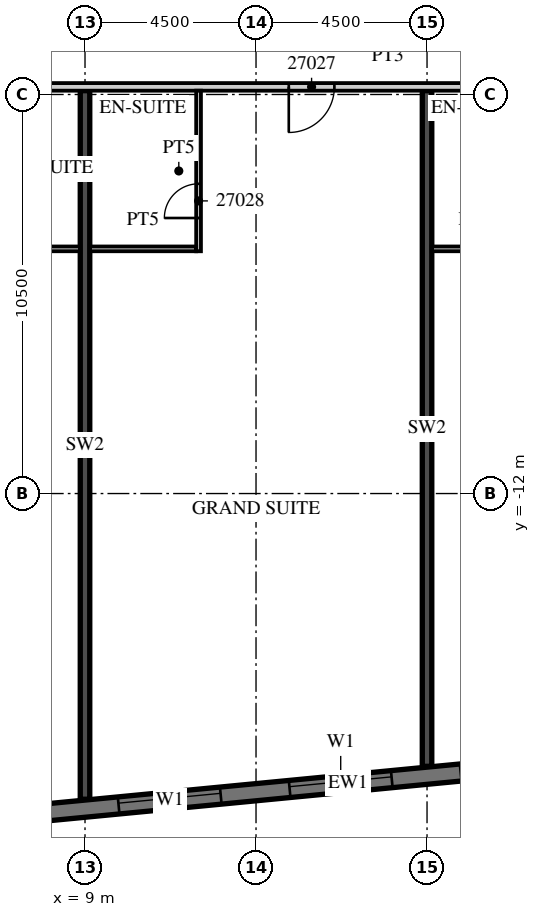
"""IFC4 building model, lengths in metres.
Left out: names, types, materials, properties, quantities, classifications, styles, units other than length and angle.
Written with IfcOpenShell. Run it as: python <this file> out.ifc"""

import sys

from ifc_helpers import new_model, si_unit, direction, frame, frame_2d, origin, place, context, subcontext, project, spatial, rectangle, extrude, element, fill, save


model = new_model("IFC4")
c1 = context("Model", 3, precision=1e-05, world=origin(), true_north=direction((0.0, 1.0)))
c2 = subcontext(c1, "Body", "Model", "MODEL_VIEW")
j1 = project(units=[si_unit("LENGTHUNIT", "METRE"), si_unit("PLANEANGLEUNIT", "RADIAN")], contexts=[c1])
p1 = place(None, origin())
s1 = spatial("IfcSite", under=j1, at=p1, CompositionType="ELEMENT")
p2 = place(p1, origin())
s2 = spatial("IfcBuilding", under=s1, at=p2, CompositionType="ELEMENT")
p3 = place(p2, frame((0.0, 0.0, 124.0)))
s3 = spatial("IfcBuildingStorey", under=s2, at=p3, CompositionType="ELEMENT", Elevation=124.0)
p4 = place(p3, frame((9.0, -20.044, 0.0), z_axis=(0.0, 0.0, 1.0), x_axis=(0.0, 1.0, 0.0)))
e1 = element("IfcWall", 1, at=p4, inside=s3, PredefinedType="SHEAR", context=c2, shape_type="SweptSolid", body=[
    extrude(rectangle(XDim=18.644, YDim=0.25, at=frame_2d((9.322, 0.0))), origin(), (0.0, 0.0, 1.0), 3.3),
])
p5 = place(p3, frame((18.0, -19.177, 0.0), z_axis=(0.0, 0.0, 1.0), x_axis=(0.0, 1.0, 0.0)))
e2 = element("IfcWall", 2, at=p5, inside=s3, PredefinedType="SHEAR", context=c2, shape_type="SweptSolid", body=[
    extrude(rectangle(XDim=17.777, YDim=0.25, at=frame_2d((8.889, 0.0))), origin(), (0.0, 0.0, 1.0), 3.3),
])
p6 = place(p3, frame((-13.521, -22.46, 0.0), z_axis=(0.0, 0.0, 1.0), x_axis=(0.995396096335, 0.095846812164, 0.0)))
e3 = element("IfcWall", 3, at=p6, inside=s3, PredefinedType="SOLIDWALL", context=c2, shape_type="SweptSolid", body=[
    extrude(rectangle(XDim=59.151, YDim=0.45, at=frame_2d((29.575, 0.0))), origin(), (0.0, 0.0, 1.0), 3.02),
])
p7 = place(p6, frame((0.91, 0.0, 0.45)))
e4 = element("IfcOpeningElement", 4, at=p7, cuts=e3, PredefinedType="OPENING", context=c2, shape_type="SweptSolid", body=[
    extrude(rectangle(XDim=2.7, YDim=2.25, at=frame_2d((1.35, 1.125))), frame((0.0, 0.235, 0.0), z_axis=(0.0, -1.0, 0.0), x_axis=(1.0, 0.0, 0.0)), (0.0, 0.0, 1.0), 0.47),
])
p8 = place(p6, frame((5.431, 0.0, 0.45)))
e5 = element("IfcOpeningElement", 5, at=p8, cuts=e3, PredefinedType="OPENING", context=c2, shape_type="SweptSolid", body=[
    extrude(rectangle(XDim=2.7, YDim=2.25, at=frame_2d((1.35, 1.125))), frame((0.0, 0.235, 0.0), z_axis=(0.0, -1.0, 0.0), x_axis=(1.0, 0.0, 0.0)), (0.0, 0.0, 1.0), 0.47),
])
p9 = place(p6, frame((9.952, 0.0, 0.45)))
e6 = element("IfcOpeningElement", 6, at=p9, cuts=e3, PredefinedType="OPENING", context=c2, shape_type="SweptSolid", body=[
    extrude(rectangle(XDim=2.7, YDim=2.25, at=frame_2d((1.35, 1.125))), frame((0.0, 0.235, 0.0), z_axis=(0.0, -1.0, 0.0), x_axis=(1.0, 0.0, 0.0)), (0.0, 0.0, 1.0), 0.47),
])
p10 = place(p6, frame((14.473, 0.0, 0.45)))
e7 = element("IfcOpeningElement", 7, at=p10, cuts=e3, PredefinedType="OPENING", context=c2, shape_type="SweptSolid", body=[
    extrude(rectangle(XDim=2.7, YDim=2.25, at=frame_2d((1.35, 1.125))), frame((0.0, 0.235, 0.0), z_axis=(0.0, -1.0, 0.0), x_axis=(1.0, 0.0, 0.0)), (0.0, 0.0, 1.0), 0.47),
])
p11 = place(p6, frame((18.994, 0.0, 0.45)))
e8 = element("IfcOpeningElement", 8, at=p11, cuts=e3, PredefinedType="OPENING", context=c2, shape_type="SweptSolid", body=[
    extrude(rectangle(XDim=2.7, YDim=2.25, at=frame_2d((1.35, 1.125))), frame((0.0, 0.235, 0.0), z_axis=(0.0, -1.0, 0.0), x_axis=(1.0, 0.0, 0.0)), (0.0, 0.0, 1.0), 0.47),
])
p12 = place(p6, frame((23.514, 0.0, 0.45)))
e9 = element("IfcOpeningElement", 9, at=p12, cuts=e3, PredefinedType="OPENING", context=c2, shape_type="SweptSolid", body=[
    extrude(rectangle(XDim=2.7, YDim=2.25, at=frame_2d((1.35, 1.125))), frame((0.0, 0.235, 0.0), z_axis=(0.0, -1.0, 0.0), x_axis=(1.0, 0.0, 0.0)), (0.0, 0.0, 1.0), 0.47),
])
p13 = place(p6, frame((28.035, 0.0, 0.45)))
e10 = element("IfcOpeningElement", 10, at=p13, cuts=e3, PredefinedType="OPENING", context=c2, shape_type="SweptSolid", body=[
    extrude(rectangle(XDim=2.7, YDim=2.25, at=frame_2d((1.35, 1.125))), frame((0.0, 0.235, 0.0), z_axis=(0.0, -1.0, 0.0), x_axis=(1.0, 0.0, 0.0)), (0.0, 0.0, 1.0), 0.47),
])
p14 = place(p6, frame((32.556, 0.0, 0.45)))
e11 = element("IfcOpeningElement", 11, at=p14, cuts=e3, PredefinedType="OPENING", context=c2, shape_type="SweptSolid", body=[
    extrude(rectangle(XDim=2.7, YDim=2.25, at=frame_2d((1.35, 1.125))), frame((0.0, 0.235, 0.0), z_axis=(0.0, -1.0, 0.0), x_axis=(1.0, 0.0, 0.0)), (0.0, 0.0, 1.0), 0.47),
])
p15 = place(p6, frame((37.077, 0.0, 0.45)))
e12 = element("IfcOpeningElement", 12, at=p15, cuts=e3, PredefinedType="OPENING", context=c2, shape_type="SweptSolid", body=[
    extrude(rectangle(XDim=2.7, YDim=2.25, at=frame_2d((1.35, 1.125))), frame((0.0, 0.235, 0.0), z_axis=(0.0, -1.0, 0.0), x_axis=(1.0, 0.0, 0.0)), (0.0, 0.0, 1.0), 0.47),
])
p16 = place(p6, frame((41.598, 0.0, 0.45)))
e13 = element("IfcOpeningElement", 13, at=p16, cuts=e3, PredefinedType="OPENING", context=c2, shape_type="SweptSolid", body=[
    extrude(rectangle(XDim=2.7, YDim=2.25, at=frame_2d((1.35, 1.125))), frame((0.0, 0.235, 0.0), z_axis=(0.0, -1.0, 0.0), x_axis=(1.0, 0.0, 0.0)), (0.0, 0.0, 1.0), 0.47),
])
p17 = place(p6, frame((46.118, 0.0, 0.45)))
e14 = element("IfcOpeningElement", 14, at=p17, cuts=e3, PredefinedType="OPENING", context=c2, shape_type="SweptSolid", body=[
    extrude(rectangle(XDim=2.7, YDim=2.25, at=frame_2d((1.35, 1.125))), frame((0.0, 0.235, 0.0), z_axis=(0.0, -1.0, 0.0), x_axis=(1.0, 0.0, 0.0)), (0.0, 0.0, 1.0), 0.47),
])
p18 = place(p6, frame((50.639, 0.0, 0.45)))
e15 = element("IfcOpeningElement", 15, at=p18, cuts=e3, PredefinedType="OPENING", context=c2, shape_type="SweptSolid", body=[
    extrude(rectangle(XDim=2.7, YDim=2.25, at=frame_2d((1.35, 1.125))), frame((0.0, 0.235, 0.0), z_axis=(0.0, -1.0, 0.0), x_axis=(1.0, 0.0, 0.0)), (0.0, 0.0, 1.0), 0.47),
])
p19 = place(p6, frame((55.15, 0.0, 0.45)))
e16 = element("IfcOpeningElement", 16, at=p19, cuts=e3, PredefinedType="OPENING", context=c2, shape_type="SweptSolid", body=[
    extrude(rectangle(XDim=2.7, YDim=2.25, at=frame_2d((1.35, 1.125))), frame((0.0, 0.235, 0.0), z_axis=(0.0, -1.0, 0.0), x_axis=(1.0, 0.0, 0.0)), (0.0, 0.0, 1.0), 0.47),
])
p20 = place(p3, frame((-13.5, -1.3, 0.0), z_axis=(0.0, 0.0, 1.0), x_axis=(1.0, 0.0, 0.0)))
e17 = element("IfcWall", 17, at=p20, inside=s3, PredefinedType="PARTITIONING", context=c2, shape_type="SweptSolid", body=[
    extrude(rectangle(XDim=60.932, YDim=0.2, at=frame_2d((30.466, 0.0))), origin(), (0.0, 0.0, 1.0), 3.02),
])
p21 = place(p20, frame((2.925, 0.0, 0.0)))
e18 = element("IfcOpeningElement", 18, at=p21, cuts=e17, PredefinedType="OPENING", context=c2, shape_type="SweptSolid", body=[
    extrude(rectangle(XDim=1.0, YDim=2.1, at=frame_2d((0.5, 1.05))), frame((0.0, 0.11, 0.0), z_axis=(0.0, -1.0, 0.0), x_axis=(1.0, 0.0, 0.0)), (0.0, 0.0, 1.0), 0.22),
])
p22 = place(p20, frame((9.863, 0.0, 0.0)))
e19 = element("IfcOpeningElement", 19, at=p22, cuts=e17, PredefinedType="OPENING", context=c2, shape_type="SweptSolid", body=[
    extrude(rectangle(XDim=1.2, YDim=2.1, at=frame_2d((0.6, 1.05))), frame((0.0, 0.11, 0.0), z_axis=(0.0, -1.0, 0.0), x_axis=(1.0, 0.0, 0.0)), (0.0, 0.0, 1.0), 0.22),
])
p23 = place(p20, frame((15.938, 0.0, 0.0)))
e20 = element("IfcOpeningElement", 20, at=p23, cuts=e17, PredefinedType="OPENING", context=c2, shape_type="SweptSolid", body=[
    extrude(rectangle(XDim=1.2, YDim=2.1, at=frame_2d((0.6, 1.05))), frame((0.0, 0.11, 0.0), z_axis=(0.0, -1.0, 0.0), x_axis=(1.0, 0.0, 0.0)), (0.0, 0.0, 1.0), 0.22),
])
p24 = place(p20, frame((27.862, 0.0, 0.0)))
e21 = element("IfcOpeningElement", 21, at=p24, cuts=e17, PredefinedType="OPENING", context=c2, shape_type="SweptSolid", body=[
    extrude(rectangle(XDim=1.2, YDim=2.1, at=frame_2d((0.6, 1.05))), frame((0.0, 0.11, 0.0), z_axis=(0.0, -1.0, 0.0), x_axis=(1.0, 0.0, 0.0)), (0.0, 0.0, 1.0), 0.22),
])
p25 = place(p20, frame((34.45, 0.0, 0.0)))
e22 = element("IfcOpeningElement", 22, at=p25, cuts=e17, PredefinedType="OPENING", context=c2, shape_type="SweptSolid", body=[
    extrude(rectangle(XDim=1.0, YDim=2.1, at=frame_2d((0.5, 1.05))), frame((0.0, 0.11, 0.0), z_axis=(0.0, -1.0, 0.0), x_axis=(1.0, 0.0, 0.0)), (0.0, 0.0, 1.0), 0.22),
])
p26 = place(p20, frame((36.55, 0.0, 0.0)))
e23 = element("IfcOpeningElement", 23, at=p26, cuts=e17, PredefinedType="OPENING", context=c2, shape_type="SweptSolid", body=[
    extrude(rectangle(XDim=1.0, YDim=2.1, at=frame_2d((0.5, 1.05))), frame((0.0, 0.11, 0.0), z_axis=(0.0, -1.0, 0.0), x_axis=(1.0, 0.0, 0.0)), (0.0, 0.0, 1.0), 0.22),
])
p27 = place(p20, frame((41.075, 0.0, 0.0)))
e24 = element("IfcOpeningElement", 24, at=p27, cuts=e17, PredefinedType="OPENING", context=c2, shape_type="SweptSolid", body=[
    extrude(rectangle(XDim=1.0, YDim=2.1, at=frame_2d((0.5, 1.05))), frame((0.0, 0.11, 0.0), z_axis=(0.0, -1.0, 0.0), x_axis=(1.0, 0.0, 0.0)), (0.0, 0.0, 1.0), 0.22),
])
p28 = place(p20, frame((45.55, 0.0, 0.0)))
e25 = element("IfcOpeningElement", 25, at=p28, cuts=e17, PredefinedType="OPENING", context=c2, shape_type="SweptSolid", body=[
    extrude(rectangle(XDim=1.0, YDim=2.1, at=frame_2d((0.5, 1.05))), frame((0.0, 0.11, 0.0), z_axis=(0.0, -1.0, 0.0), x_axis=(1.0, 0.0, 0.0)), (0.0, 0.0, 1.0), 0.22),
])
p29 = place(p20, frame((50.075, 0.0, 0.0)))
e26 = element("IfcOpeningElement", 26, at=p29, cuts=e17, PredefinedType="OPENING", context=c2, shape_type="SweptSolid", body=[
    extrude(rectangle(XDim=1.0, YDim=2.1, at=frame_2d((0.5, 1.05))), frame((0.0, 0.11, 0.0), z_axis=(0.0, -1.0, 0.0), x_axis=(1.0, 0.0, 0.0)), (0.0, 0.0, 1.0), 0.22),
])
p30 = place(p20, frame((54.575, 0.0, 0.0)))
e27 = element("IfcOpeningElement", 27, at=p30, cuts=e17, PredefinedType="OPENING", context=c2, shape_type="SweptSolid", body=[
    extrude(rectangle(XDim=1.0, YDim=2.1, at=frame_2d((0.5, 1.05))), frame((0.0, 0.11, 0.0), z_axis=(0.0, -1.0, 0.0), x_axis=(1.0, 0.0, 0.0)), (0.0, 0.0, 1.0), 0.22),
])
p31 = place(p20, frame((59.882, 0.0, 0.0)))
e28 = element("IfcOpeningElement", 28, at=p31, cuts=e17, PredefinedType="OPENING", context=c2, shape_type="SweptSolid", body=[
    extrude(rectangle(XDim=0.9, YDim=2.1, at=frame_2d((0.45, 1.05))), frame((0.0, 0.11, 0.0), z_axis=(0.0, -1.0, 0.0), x_axis=(1.0, 0.0, 0.0)), (0.0, 0.0, 1.0), 0.22),
])
p32 = place(p3, frame((6.075, -5.562, 0.0), z_axis=(0.0, 0.0, 1.0), x_axis=(1.0, 0.0, 0.0)))
e29 = element("IfcWall", 29, at=p32, inside=s3, PredefinedType="PARTITIONING", context=c2, shape_type="SweptSolid", body=[
    extrude(rectangle(XDim=2.8, YDim=0.125, at=frame_2d((1.4, 0.0))), origin(), (0.0, 0.0, 1.0), 3.02),
])
p33 = place(p3, frame((11.988, -5.625, 0.0), z_axis=(0.0, 0.0, 1.0), x_axis=(0.0, 1.0, 0.0)))
e30 = element("IfcWall", 30, at=p33, inside=s3, PredefinedType="PARTITIONING", context=c2, shape_type="SweptSolid", body=[
    extrude(rectangle(XDim=4.225, YDim=0.125, at=frame_2d((2.113, 0.0))), origin(), (0.0, 0.0, 1.0), 3.02),
])
p34 = place(p33, frame((0.875, 0.0, 0.0)))
e31 = element("IfcOpeningElement", 31, at=p34, cuts=e30, PredefinedType="OPENING", context=c2, shape_type="SweptSolid", body=[
    extrude(rectangle(XDim=0.9, YDim=2.1, at=frame_2d((0.45, 1.05))), frame((0.0, 0.073, 0.0), z_axis=(0.0, -1.0, 0.0), x_axis=(1.0, 0.0, 0.0)), (0.0, 0.0, 1.0), 0.145),
])
p35 = place(p3, frame((9.125, -5.562, 0.0), z_axis=(0.0, 0.0, 1.0), x_axis=(1.0, 0.0, 0.0)))
e32 = element("IfcWall", 32, at=p35, inside=s3, PredefinedType="PARTITIONING", context=c2, shape_type="SweptSolid", body=[
    extrude(rectangle(XDim=2.8, YDim=0.125, at=frame_2d((1.4, 0.0))), origin(), (0.0, 0.0, 1.0), 3.02),
])
p36 = place(p3, frame((18.125, -5.562, 0.0), z_axis=(0.0, 0.0, 1.0), x_axis=(1.0, 0.0, 0.0)))
e33 = element("IfcWall", 33, at=p36, inside=s3, PredefinedType="PARTITIONING", context=c2, shape_type="SweptSolid", body=[
    extrude(rectangle(XDim=2.25, YDim=0.125, at=frame_2d((1.125, 0.0))), origin(), (0.0, 0.0, 1.0), 3.02),
])
p37 = place(p12, origin())
e34 = element("IfcWindow", 34, at=p37, inside=s3, PartitioningType="SINGLE_PANEL", PredefinedType="WINDOW", context=c2, shape_type="SweptSolid", body=[
    extrude(rectangle(XDim=2.7, YDim=2.25, at=frame_2d((1.35, 1.125))), frame((0.0, 0.09, 0.0), z_axis=(0.0, -1.0, 0.0), x_axis=(1.0, 0.0, 0.0)), (0.0, 0.0, 1.0), 0.06),
])
fill(e9, e34)
p38 = place(p13, origin())
e35 = element("IfcWindow", 35, at=p38, inside=s3, PartitioningType="SINGLE_PANEL", PredefinedType="WINDOW", context=c2, shape_type="SweptSolid", body=[
    extrude(rectangle(XDim=2.7, YDim=2.25, at=frame_2d((1.35, 1.125))), frame((0.0, 0.09, 0.0), z_axis=(0.0, -1.0, 0.0), x_axis=(1.0, 0.0, 0.0)), (0.0, 0.0, 1.0), 0.06),
])
fill(e10, e35)
p39 = place(p24, origin())
e36 = element("IfcDoor", 36, at=p39, inside=s3, OperationType="SINGLE_SWING_LEFT", PredefinedType="DOOR", context=c2, shape_type="SweptSolid", body=[
    extrude(rectangle(XDim=1.2, YDim=2.1, at=frame_2d((0.6, 1.05))), frame((0.0, 0.025, 0.0), z_axis=(0.0, -1.0, 0.0), x_axis=(1.0, 0.0, 0.0)), (0.0, 0.0, 1.0), 0.05),
])
fill(e21, e36)
p40 = place(p34, origin())
e37 = element("IfcDoor", 37, at=p40, inside=s3, OperationType="SINGLE_SWING_LEFT", PredefinedType="DOOR", context=c2, shape_type="SweptSolid", body=[
    extrude(rectangle(XDim=0.9, YDim=2.1, at=frame_2d((0.45, 1.05))), frame((0.0, 0.025, 0.0), z_axis=(0.0, -1.0, 0.0), x_axis=(1.0, 0.0, 0.0)), (0.0, 0.0, 1.0), 0.05),
])
fill(e31, e37)
save(model, sys.argv[1])
